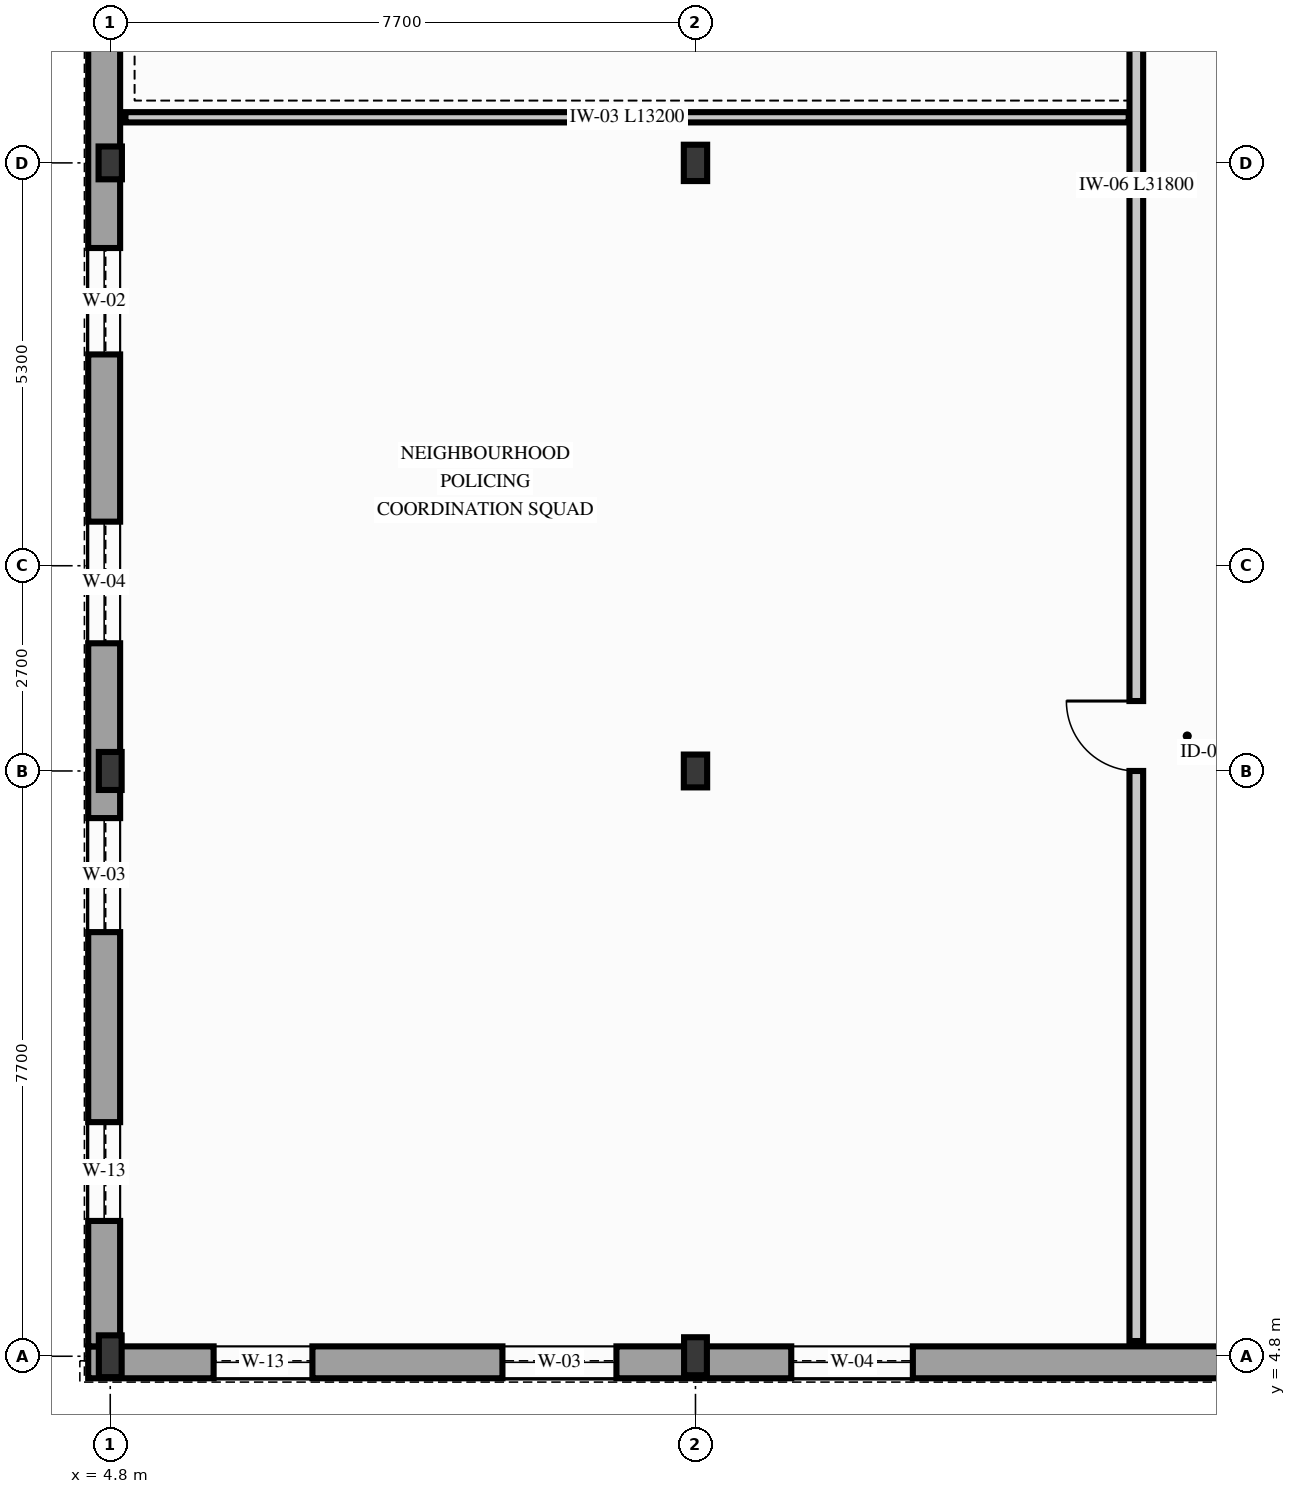
"""IFC4 building model, lengths in metres.
Left out: names, types, materials, properties, quantities, classifications, styles, units other than length and angle.
Written with IfcOpenShell. Run it as: python <this file> out.ifc"""

import sys

from ifc_helpers import new_model, si_unit, direction, frame, frame_2d, origin, origin_2d, place, context, subcontext, project, spatial, rectangle, i_section, extrude, element, fill, save


model = new_model("IFC4")
c1 = context("Model", 3, precision=1e-05, world=origin(), true_north=direction((0.0, 1.0)))
c2 = subcontext(c1, "Body", "Model", "MODEL_VIEW")
j1 = project(units=[si_unit("LENGTHUNIT", "METRE"), si_unit("PLANEANGLEUNIT", "RADIAN")], contexts=[c1])
p1 = place(None, origin())
s1 = spatial("IfcSite", under=j1, at=p1, CompositionType="ELEMENT")
p2 = place(p1, origin())
s2 = spatial("IfcBuilding", under=s1, at=p2, CompositionType="ELEMENT")
p3 = place(p2, frame((0.0, 0.0, 9.3)))
s3 = spatial("IfcBuildingStorey", under=s2, at=p3, CompositionType="ELEMENT", Elevation=9.3)
p4 = place(p3, frame((4.8, 4.8, 0.0), z_axis=(0.0, 0.0, 1.0), x_axis=(1.0, 0.0, 0.0)))
e1 = element("IfcColumn", 1, at=p4, inside=s3, PredefinedType="COLUMN", context=c2, shape_type="SweptSolid", body=[
    extrude(i_section(OverallWidth=0.3, OverallDepth=0.55, WebThickness=0.015, FlangeThickness=0.029, FilletRadius=0.027, at=origin_2d()), origin(), (0.0, 0.0, 1.0), 4.2),
])
p5 = place(p3, frame((4.8, 12.5, 0.0), z_axis=(0.0, 0.0, 1.0), x_axis=(1.0, 0.0, 0.0)))
e2 = element("IfcColumn", 2, at=p5, inside=s3, PredefinedType="COLUMN", context=c2, shape_type="SweptSolid", body=[
    extrude(i_section(OverallWidth=0.3, OverallDepth=0.5, WebThickness=0.014, FlangeThickness=0.028, FilletRadius=0.027, at=origin_2d()), origin(), (0.0, 0.0, 1.0), 4.2),
])
p6 = place(p3, frame((4.8, 20.5, 0.0), z_axis=(0.0, 0.0, 1.0), x_axis=(1.0, 0.0, 0.0)))
e3 = element("IfcColumn", 3, at=p6, inside=s3, PredefinedType="COLUMN", context=c2, shape_type="SweptSolid", body=[
    extrude(i_section(OverallWidth=0.307, OverallDepth=0.432, WebThickness=0.021, FlangeThickness=0.04, FilletRadius=0.027, at=origin_2d()), origin(), (0.0, 0.0, 1.0), 4.2),
])
p7 = place(p3, frame((12.5, 4.8, 0.0), z_axis=(0.0, 0.0, 1.0), x_axis=(1.0, 0.0, 0.0)))
e4 = element("IfcColumn", 4, at=p7, inside=s3, PredefinedType="COLUMN", context=c2, shape_type="SweptSolid", body=[
    extrude(i_section(OverallWidth=0.3, OverallDepth=0.5, WebThickness=0.014, FlangeThickness=0.028, FilletRadius=0.027, at=origin_2d()), origin(), (0.0, 0.0, 1.0), 4.2),
])
p8 = place(p3, frame((12.5, 12.5, 0.0), z_axis=(0.0, 0.0, 1.0), x_axis=(1.0, 0.0, 0.0)))
e5 = element("IfcColumn", 5, at=p8, inside=s3, PredefinedType="COLUMN", context=c2, shape_type="SweptSolid", body=[
    extrude(i_section(OverallWidth=0.307, OverallDepth=0.432, WebThickness=0.021, FlangeThickness=0.04, FilletRadius=0.027, at=origin_2d()), origin(), (0.0, 0.0, 1.0), 4.2),
])
p9 = place(p3, frame((12.5, 20.5, 0.0), z_axis=(0.0, 0.0, 1.0), x_axis=(1.0, 0.0, 0.0)))
e6 = element("IfcColumn", 6, at=p9, inside=s3, PredefinedType="COLUMN", context=c2, shape_type="SweptSolid", body=[
    extrude(i_section(OverallWidth=0.307, OverallDepth=0.478, WebThickness=0.021, FlangeThickness=0.04, FilletRadius=0.027, at=origin_2d()), origin(), (0.0, 0.0, 1.0), 4.2),
])
p10 = place(p3, frame((4.51, 4.72, 0.0), z_axis=(0.0, 0.0, 1.0), x_axis=(1.0, 0.0, 0.0)))
e7 = element("IfcWall", 7, at=p10, inside=s3, PredefinedType="SOLIDWALL", context=c2, shape_type="SweptSolid", body=[
    extrude(rectangle(XDim=30.08, YDim=0.42, at=frame_2d((15.04, 0.0))), origin(), (0.0, 0.0, 1.0), 3.62),
])
p11 = place(p10, frame((1.65, 0.0, 0.85)))
e8 = element("IfcOpeningElement", 8, at=p11, cuts=e7, PredefinedType="OPENING", context=c2, shape_type="SweptSolid", body=[
    extrude(rectangle(XDim=1.3, YDim=2.15, at=frame_2d((0.65, 1.075))), frame((0.0, 0.22, 0.0), z_axis=(0.0, -1.0, 0.0), x_axis=(1.0, 0.0, 0.0)), (0.0, 0.0, 1.0), 0.44),
])
p12 = place(p10, frame((5.45, 0.0, 0.84)))
e9 = element("IfcOpeningElement", 9, at=p12, cuts=e7, PredefinedType="OPENING", context=c2, shape_type="SweptSolid", body=[
    extrude(rectangle(XDim=1.5, YDim=2.3, at=frame_2d((0.75, 1.15))), frame((0.0, 0.22, 0.0), z_axis=(0.0, -1.0, 0.0), x_axis=(1.0, 0.0, 0.0)), (0.0, 0.0, 1.0), 0.44),
])
p13 = place(p10, frame((9.25, 0.0, 0.74)))
e10 = element("IfcOpeningElement", 10, at=p13, cuts=e7, PredefinedType="OPENING", context=c2, shape_type="SweptSolid", body=[
    extrude(rectangle(XDim=1.6, YDim=2.4, at=frame_2d((0.8, 1.2))), frame((0.0, 0.22, 0.0), z_axis=(0.0, -1.0, 0.0), x_axis=(1.0, 0.0, 0.0)), (0.0, 0.0, 1.0), 0.44),
])
p14 = place(p10, frame((20.65, 0.0, 0.74)))
e11 = element("IfcOpeningElement", 11, at=p14, cuts=e7, PredefinedType="OPENING", context=c2, shape_type="SweptSolid", body=[
    extrude(rectangle(XDim=1.8, YDim=2.4, at=frame_2d((0.9, 1.2))), frame((0.0, 0.22, 0.0), z_axis=(0.0, -1.0, 0.0), x_axis=(1.0, 0.0, 0.0)), (0.0, 0.0, 1.0), 0.44),
])
p15 = place(p10, frame((24.45, 0.0, 0.69)))
e12 = element("IfcOpeningElement", 12, at=p15, cuts=e7, PredefinedType="OPENING", context=c2, shape_type="SweptSolid", body=[
    extrude(rectangle(XDim=1.9, YDim=2.45, at=frame_2d((0.95, 1.225))), frame((0.0, 0.22, 0.0), z_axis=(0.0, -1.0, 0.0), x_axis=(1.0, 0.0, 0.0)), (0.0, 0.0, 1.0), 0.44),
])
p16 = place(p3, frame((4.72, 4.93, 0.0), z_axis=(0.0, 0.0, 1.0), x_axis=(0.0, 1.0, 0.0)))
e13 = element("IfcWall", 13, at=p16, inside=s3, PredefinedType="SOLIDWALL", context=c2, shape_type="SweptSolid", body=[
    extrude(rectangle(XDim=31.57, YDim=0.42, at=frame_2d((15.785, 0.0))), origin(), (0.0, 0.0, 1.0), 3.7),
])
p17 = place(p16, frame((1.65, 0.0, 0.85)))
e14 = element("IfcOpeningElement", 14, at=p17, cuts=e13, PredefinedType="OPENING", context=c2, shape_type="SweptSolid", body=[
    extrude(rectangle(XDim=1.3, YDim=2.15, at=frame_2d((0.65, 1.075))), frame((0.0, 0.22, 0.0), z_axis=(0.0, -1.0, 0.0), x_axis=(1.0, 0.0, 0.0)), (0.0, 0.0, 1.0), 0.44),
])
p18 = place(p16, frame((5.45, 0.0, 0.84)))
e15 = element("IfcOpeningElement", 15, at=p18, cuts=e13, PredefinedType="OPENING", context=c2, shape_type="SweptSolid", body=[
    extrude(rectangle(XDim=1.5, YDim=2.3, at=frame_2d((0.75, 1.15))), frame((0.0, 0.22, 0.0), z_axis=(0.0, -1.0, 0.0), x_axis=(1.0, 0.0, 0.0)), (0.0, 0.0, 1.0), 0.44),
])
p19 = place(p16, frame((9.25, 0.0, 0.74)))
e16 = element("IfcOpeningElement", 16, at=p19, cuts=e13, PredefinedType="OPENING", context=c2, shape_type="SweptSolid", body=[
    extrude(rectangle(XDim=1.6, YDim=2.4, at=frame_2d((0.8, 1.2))), frame((0.0, 0.22, 0.0), z_axis=(0.0, -1.0, 0.0), x_axis=(1.0, 0.0, 0.0)), (0.0, 0.0, 1.0), 0.44),
])
p20 = place(p16, frame((13.05, 0.0, 0.85)))
e17 = element("IfcOpeningElement", 17, at=p20, cuts=e13, PredefinedType="OPENING", context=c2, shape_type="SweptSolid", body=[
    extrude(rectangle(XDim=1.4, YDim=2.2, at=frame_2d((0.7, 1.1))), frame((0.0, 0.22, 0.0), z_axis=(0.0, -1.0, 0.0), x_axis=(1.0, 0.0, 0.0)), (0.0, 0.0, 1.0), 0.44),
])
p21 = place(p16, frame((20.65, 0.0, 0.74)))
e18 = element("IfcOpeningElement", 18, at=p21, cuts=e13, PredefinedType="OPENING", context=c2, shape_type="SweptSolid", body=[
    extrude(rectangle(XDim=1.8, YDim=2.4, at=frame_2d((0.9, 1.2))), frame((0.0, 0.22, 0.0), z_axis=(0.0, -1.0, 0.0), x_axis=(1.0, 0.0, 0.0)), (0.0, 0.0, 1.0), 0.44),
])
p22 = place(p16, frame((24.45, 0.0, 0.69)))
e19 = element("IfcOpeningElement", 19, at=p22, cuts=e13, PredefinedType="OPENING", context=c2, shape_type="SweptSolid", body=[
    extrude(rectangle(XDim=1.9, YDim=2.45, at=frame_2d((0.95, 1.225))), frame((0.0, 0.22, 0.0), z_axis=(0.0, -1.0, 0.0), x_axis=(1.0, 0.0, 0.0)), (0.0, 0.0, 1.0), 0.44),
])
p23 = place(p3, frame((18.3, 5.0, 0.0), z_axis=(0.0, 0.0, 1.0), x_axis=(0.0, 1.0, 0.0)))
e20 = element("IfcWall", 20, at=p23, inside=s3, PredefinedType="PARTITIONING", context=c2, shape_type="SweptSolid", body=[
    extrude(rectangle(XDim=31.8, YDim=0.18, at=frame_2d((15.9, 0.0))), origin(), (0.0, 0.0, 1.0), 3.698),
])
p24 = place(p23, frame((7.5, 0.0, 0.0)))
e21 = element("IfcOpeningElement", 21, at=p24, cuts=e20, PredefinedType="OPENING", context=c2, shape_type="SweptSolid", body=[
    extrude(rectangle(XDim=0.92, YDim=2.12, at=frame_2d((0.46, 1.06))), frame((0.0, 0.1, 0.0), z_axis=(0.0, -1.0, 0.0), x_axis=(1.0, 0.0, 0.0)), (0.0, 0.0, 1.0), 0.2),
])
p25 = place(p23, frame((22.0, 0.0, 0.0)))
e22 = element("IfcOpeningElement", 22, at=p25, cuts=e20, PredefinedType="OPENING", context=c2, shape_type="SweptSolid", body=[
    extrude(rectangle(XDim=0.9, YDim=2.1, at=frame_2d((0.45, 1.05))), frame((0.0, 0.1, 0.0), z_axis=(0.0, -1.0, 0.0), x_axis=(1.0, 0.0, 0.0)), (0.0, 0.0, 1.0), 0.2),
])
p26 = place(p3, frame((5.0, 21.1, 0.0), z_axis=(0.0, 0.0, 1.0), x_axis=(1.0, 0.0, 0.0)))
e23 = element("IfcWall", 23, at=p26, inside=s3, PredefinedType="PARTITIONING", context=c2, shape_type="SweptSolid", body=[
    extrude(rectangle(XDim=13.2, YDim=0.135, at=frame_2d((6.6, 0.0))), origin(), (0.0, 0.0, 1.0), 3.598),
])
p27 = place(p11, origin())
e24 = element("IfcWindow", 24, at=p27, inside=s3, PartitioningType="SINGLE_PANEL", PredefinedType="WINDOW", context=c2, shape_type="SweptSolid", body=[
    extrude(rectangle(XDim=1.3, YDim=2.15, at=frame_2d((0.65, 1.075))), frame((0.0, 0.03, 0.0), z_axis=(0.0, -1.0, 0.0), x_axis=(1.0, 0.0, 0.0)), (0.0, 0.0, 1.0), 0.06),
])
fill(e8, e24)
p28 = place(p12, origin())
e25 = element("IfcWindow", 25, at=p28, inside=s3, PartitioningType="SINGLE_PANEL", PredefinedType="WINDOW", context=c2, shape_type="SweptSolid", body=[
    extrude(rectangle(XDim=1.5, YDim=2.3, at=frame_2d((0.75, 1.15))), frame((0.0, 0.03, 0.0), z_axis=(0.0, -1.0, 0.0), x_axis=(1.0, 0.0, 0.0)), (0.0, 0.0, 1.0), 0.06),
])
fill(e9, e25)
p29 = place(p13, origin())
e26 = element("IfcWindow", 26, at=p29, inside=s3, PartitioningType="SINGLE_PANEL", PredefinedType="WINDOW", context=c2, shape_type="SweptSolid", body=[
    extrude(rectangle(XDim=1.6, YDim=2.4, at=frame_2d((0.8, 1.2))), frame((0.0, 0.03, 0.0), z_axis=(0.0, -1.0, 0.0), x_axis=(1.0, 0.0, 0.0)), (0.0, 0.0, 1.0), 0.06),
])
fill(e10, e26)
p30 = place(p17, origin())
e27 = element("IfcWindow", 27, at=p30, inside=s3, PartitioningType="SINGLE_PANEL", PredefinedType="WINDOW", context=c2, shape_type="SweptSolid", body=[
    extrude(rectangle(XDim=1.3, YDim=2.15, at=frame_2d((0.65, 1.075))), frame((0.0, 0.03, 0.0), z_axis=(0.0, -1.0, 0.0), x_axis=(1.0, 0.0, 0.0)), (0.0, 0.0, 1.0), 0.06),
])
fill(e14, e27)
p31 = place(p18, origin())
e28 = element("IfcWindow", 28, at=p31, inside=s3, PartitioningType="SINGLE_PANEL", PredefinedType="WINDOW", context=c2, shape_type="SweptSolid", body=[
    extrude(rectangle(XDim=1.5, YDim=2.3, at=frame_2d((0.75, 1.15))), frame((0.0, 0.03, 0.0), z_axis=(0.0, -1.0, 0.0), x_axis=(1.0, 0.0, 0.0)), (0.0, 0.0, 1.0), 0.06),
])
fill(e15, e28)
p32 = place(p19, origin())
e29 = element("IfcWindow", 29, at=p32, inside=s3, PartitioningType="SINGLE_PANEL", PredefinedType="WINDOW", context=c2, shape_type="SweptSolid", body=[
    extrude(rectangle(XDim=1.6, YDim=2.4, at=frame_2d((0.8, 1.2))), frame((0.0, 0.03, 0.0), z_axis=(0.0, -1.0, 0.0), x_axis=(1.0, 0.0, 0.0)), (0.0, 0.0, 1.0), 0.06),
])
fill(e16, e29)
p33 = place(p20, origin())
e30 = element("IfcWindow", 30, at=p33, inside=s3, PartitioningType="SINGLE_PANEL", PredefinedType="WINDOW", context=c2, shape_type="SweptSolid", body=[
    extrude(rectangle(XDim=1.4, YDim=2.2, at=frame_2d((0.7, 1.1))), frame((0.0, 0.03, 0.0), z_axis=(0.0, -1.0, 0.0), x_axis=(1.0, 0.0, 0.0)), (0.0, 0.0, 1.0), 0.06),
])
fill(e17, e30)
p34 = place(p24, origin())
e31 = element("IfcDoor", 31, at=p34, inside=s3, OperationType="SINGLE_SWING_RIGHT", PredefinedType="DOOR", context=c2, shape_type="SweptSolid", body=[
    extrude(rectangle(XDim=0.92, YDim=2.12, at=frame_2d((0.46, 1.06))), frame((0.0, 0.025, 0.0), z_axis=(0.0, -1.0, 0.0), x_axis=(1.0, 0.0, 0.0)), (0.0, 0.0, 1.0), 0.05),
])
fill(e21, e31)
save(model, sys.argv[1])
